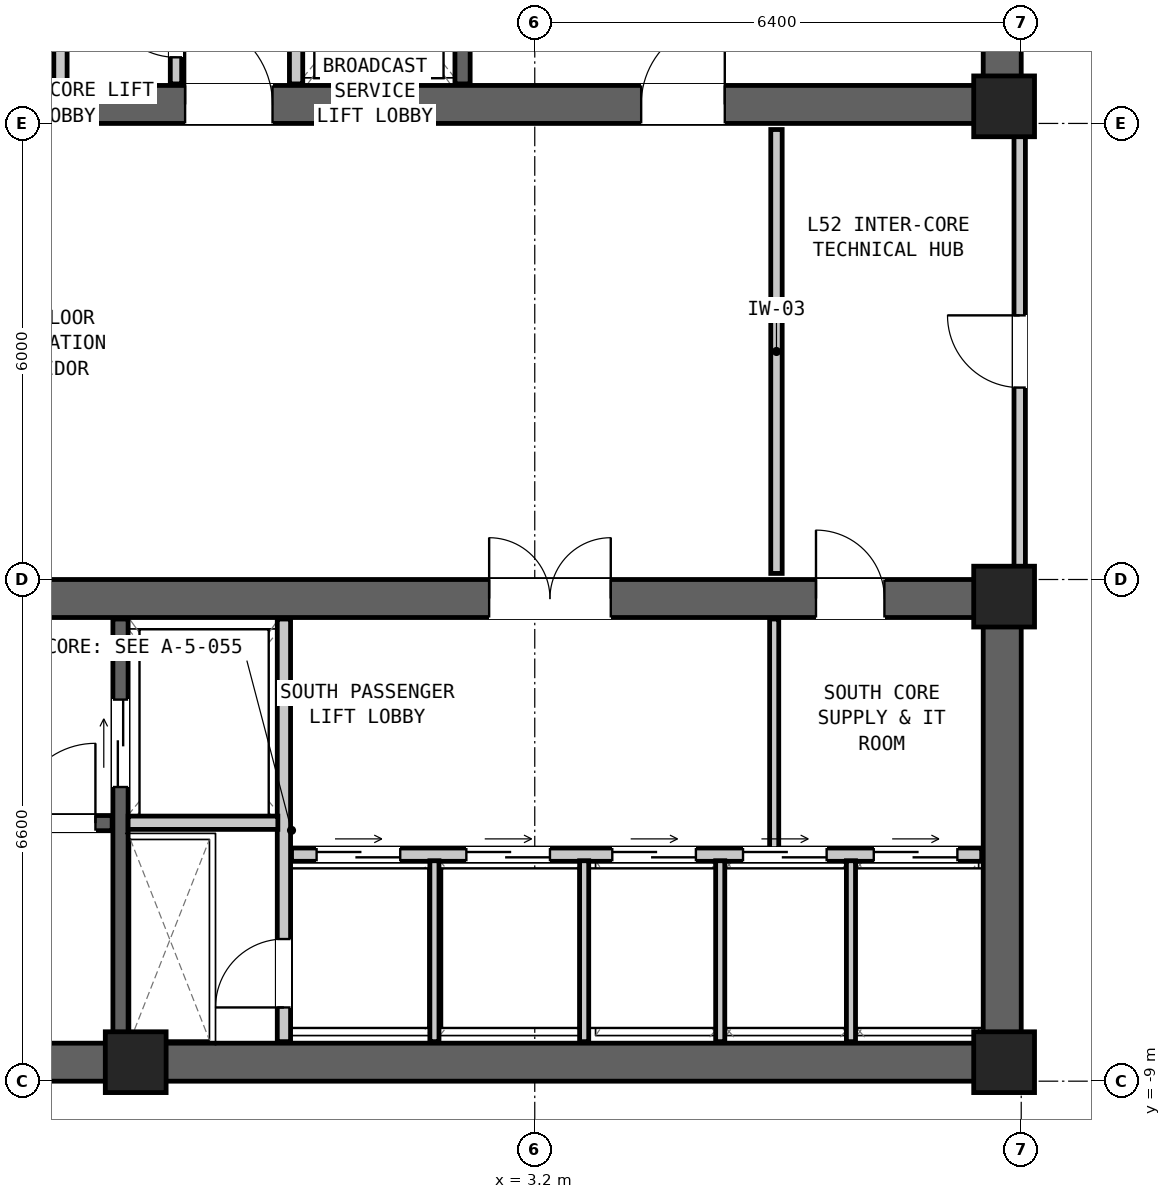
"""IFC4 building model, lengths in metres.
Left out: names, types, materials, properties, quantities, classifications, styles, units other than length and angle.
Written with IfcOpenShell. Run it as: python <this file> out.ifc"""

import sys

from ifc_helpers import new_model, si_unit, direction, frame, frame_2d, origin, origin_2d, place, context, subcontext, project, spatial, rectangle, extrude, element, fill, save


model = new_model("IFC4")
c1 = context("Model", 3, precision=1e-05, world=origin(), true_north=direction((0.0, 1.0)))
c2 = subcontext(c1, "Body", "Model", "MODEL_VIEW")
j1 = project(units=[si_unit("LENGTHUNIT", "METRE"), si_unit("PLANEANGLEUNIT", "RADIAN")], contexts=[c1])
p1 = place(None, origin())
s1 = spatial("IfcSite", under=j1, at=p1, CompositionType="ELEMENT")
p2 = place(p1, origin())
s2 = spatial("IfcBuilding", under=s1, at=p2, CompositionType="ELEMENT")
p3 = place(p2, frame((0.0, 0.0, 177.5)))
s3 = spatial("IfcBuildingStorey", under=s2, at=p3, CompositionType="ELEMENT", Elevation=177.5)
p4 = place(p3, frame((-9.6, 3.85, 0.0), z_axis=(0.0, 0.0, 1.0), x_axis=(1.0, 0.0, 0.0)))
e1 = element("IfcWall", 1, at=p4, inside=s3, PredefinedType="SHEAR", context=c2, shape_type="SweptSolid", body=[
    extrude(rectangle(XDim=19.2, YDim=0.5, at=frame_2d((9.6, 0.0))), origin(), (0.0, 0.0, 1.0), 3.05),
])
p5 = place(p4, frame((14.2, 0.0, 0.0)))
e2 = element("IfcOpeningElement", 2, at=p5, cuts=e1, PredefinedType="OPENING", context=c2, shape_type="SweptSolid", body=[
    extrude(rectangle(XDim=1.1, YDim=2.08, at=frame_2d((0.55, 1.04))), frame((0.0, 0.262, 0.0), z_axis=(0.0, -1.0, 0.0), x_axis=(1.0, 0.0, 0.0)), (0.0, 0.0, 1.0), 0.524),
])
p6 = place(p4, frame((8.2, 0.0, 0.0)))
e3 = element("IfcOpeningElement", 3, at=p6, cuts=e1, PredefinedType="OPENING", context=c2, shape_type="SweptSolid", body=[
    extrude(rectangle(XDim=1.15, YDim=2.1, at=frame_2d((0.575, 1.05))), frame((0.0, 0.262, 0.0), z_axis=(0.0, -1.0, 0.0), x_axis=(1.0, 0.0, 0.0)), (0.0, 0.0, 1.0), 0.524),
])
p7 = place(p4, frame((2.5, 0.0, 0.0)))
e4 = element("IfcOpeningElement", 4, at=p7, cuts=e1, PredefinedType="OPENING", context=c2, shape_type="SweptSolid", body=[
    extrude(rectangle(XDim=1.6, YDim=2.12, at=frame_2d((0.8, 1.06))), frame((0.0, 0.262, 0.0), z_axis=(0.0, -1.0, 0.0), x_axis=(1.0, 0.0, 0.0)), (0.0, 0.0, 1.0), 0.524),
])
p8 = place(p3, frame((9.35, 3.6, 0.0), z_axis=(0.0, 0.0, 1.0), x_axis=(0.0, 1.0, 0.0)))
e5 = element("IfcWall", 5, at=p8, inside=s3, PredefinedType="SHEAR", context=c2, shape_type="SweptSolid", body=[
    extrude(rectangle(XDim=6.6, YDim=0.5, at=frame_2d((3.3, 0.0))), origin(), (0.0, 0.0, 1.0), 3.05),
])
p9 = place(p3, frame((-9.6, -8.75, 0.0), z_axis=(0.0, 0.0, 1.0), x_axis=(1.0, 0.0, 0.0)))
e6 = element("IfcWall", 6, at=p9, inside=s3, PredefinedType="SHEAR", context=c2, shape_type="SweptSolid", body=[
    extrude(rectangle(XDim=19.2, YDim=0.5, at=frame_2d((9.6, 0.0))), origin(), (0.0, 0.0, 1.0), 3.05),
])
p10 = place(p3, frame((-9.6, -2.65, 0.0), z_axis=(0.0, 0.0, 1.0), x_axis=(1.0, 0.0, 0.0)))
e7 = element("IfcWall", 7, at=p10, inside=s3, PredefinedType="SHEAR", context=c2, shape_type="SweptSolid", body=[
    extrude(rectangle(XDim=19.2, YDim=0.5, at=frame_2d((9.6, 0.0))), origin(), (0.0, 0.0, 1.0), 3.05),
])
p11 = place(p10, frame((3.8, 0.0, 0.0)))
e8 = element("IfcOpeningElement", 8, at=p11, cuts=e7, PredefinedType="OPENING", context=c2, shape_type="SweptSolid", body=[
    extrude(rectangle(XDim=1.1, YDim=2.08, at=frame_2d((0.55, 1.04))), frame((0.0, 0.262, 0.0), z_axis=(0.0, -1.0, 0.0), x_axis=(1.0, 0.0, 0.0)), (0.0, 0.0, 1.0), 0.524),
])
p12 = place(p10, frame((12.2, 0.0, 0.0)))
e9 = element("IfcOpeningElement", 9, at=p12, cuts=e7, PredefinedType="OPENING", context=c2, shape_type="SweptSolid", body=[
    extrude(rectangle(XDim=1.6, YDim=2.12, at=frame_2d((0.8, 1.06))), frame((0.0, 0.262, 0.0), z_axis=(0.0, -1.0, 0.0), x_axis=(1.0, 0.0, 0.0)), (0.0, 0.0, 1.0), 0.524),
])
p13 = place(p10, frame((16.5, 0.0, 0.0)))
e10 = element("IfcOpeningElement", 10, at=p13, cuts=e7, PredefinedType="OPENING", context=c2, shape_type="SweptSolid", body=[
    extrude(rectangle(XDim=0.9, YDim=2.05, at=frame_2d((0.45, 1.025))), frame((0.0, 0.262, 0.0), z_axis=(0.0, -1.0, 0.0), x_axis=(1.0, 0.0, 0.0)), (0.0, 0.0, 1.0), 0.524),
])
p14 = place(p3, frame((9.35, -9.0, 0.0), z_axis=(0.0, 0.0, 1.0), x_axis=(0.0, 1.0, 0.0)))
e11 = element("IfcWall", 11, at=p14, inside=s3, PredefinedType="SHEAR", context=c2, shape_type="SweptSolid", body=[
    extrude(rectangle(XDim=6.6, YDim=0.5, at=frame_2d((3.3, 0.0))), origin(), (0.0, 0.0, 1.0), 3.05),
])
for number, where, z_axis, x_axis in (
    (12, (9.375, 3.825, 0.0), (0.0, 0.0, 1.0), (1.0, 0.0, 0.0)),
    (13, (9.375, -2.625, 0.0), (0.0, 0.0, 1.0), (1.0, 0.0, 0.0)),
    (14, (-2.05, -8.75, 0.0), (0.0, 0.0, 1.0), (1.0, 0.0, 0.0)),
    (15, (9.375, -8.75, 0.0), (0.0, 0.0, 1.0), (1.0, 0.0, 0.0)),
):
    element("IfcColumn", number, at=place(p3, frame(where, z_axis=z_axis, x_axis=x_axis)), inside=s3, PredefinedType="COLUMN", context=c2, shape_type="SweptSolid", body=[
        extrude(rectangle(XDim=0.8, YDim=0.8, at=origin_2d()), origin(), (0.0, 0.0, 1.0), 3.05),
    ])
p15 = place(p3, frame((2.25, 4.12, 0.0), z_axis=(0.0, 0.0, 1.0), x_axis=(0.0, 1.0, 0.0)))
e16 = element("IfcWall", 16, at=p15, inside=s3, PredefinedType="SHEAR", context=c2, shape_type="SweptSolid", body=[
    extrude(rectangle(XDim=5.56, YDim=0.2, at=frame_2d((2.78, 0.0))), origin(), (0.0, 0.0, 1.0), 2.83),
])
p16 = place(p15, frame((0.65, 0.0, 0.0)))
e17 = element("IfcOpeningElement", 17, at=p16, cuts=e16, PredefinedType="OPENING", context=c2, shape_type="SweptSolid", body=[
    extrude(rectangle(XDim=1.15, YDim=2.08, at=frame_2d((0.575, 1.04))), frame((0.0, 0.112, 0.0), z_axis=(0.0, -1.0, 0.0), x_axis=(1.0, 0.0, 0.0)), (0.0, 0.0, 1.0), 0.224),
])
p17 = place(p3, frame((0.06, 4.12, 0.0), z_axis=(0.0, 0.0, 1.0), x_axis=(0.0, 1.0, 0.0)))
e18 = element("IfcWall", 18, at=p17, inside=s3, PredefinedType="PARTITIONING", context=c2, shape_type="SweptSolid", body=[
    extrude(rectangle(XDim=5.56, YDim=0.175, at=frame_2d((2.78, 0.0))), origin(), (0.0, 0.0, 1.0), 2.83),
])
p18 = place(p17, frame((3.1, 0.0, 0.0)))
e19 = element("IfcOpeningElement", 19, at=p18, cuts=e18, PredefinedType="OPENING", context=c2, shape_type="SweptSolid", body=[
    extrude(rectangle(XDim=1.4, YDim=2.12, at=frame_2d((0.7, 1.06))), frame((0.0, 0.1, 0.0), z_axis=(0.0, -1.0, 0.0), x_axis=(1.0, 0.0, 0.0)), (0.0, 0.0, 1.0), 0.199),
])
p19 = place(p3, frame((-3.04, 4.12, 0.0), z_axis=(0.0, 0.0, 1.0), x_axis=(0.0, 1.0, 0.0)))
e20 = element("IfcWall", 20, at=p19, inside=s3, PredefinedType="PARTITIONING", context=c2, shape_type="SweptSolid", body=[
    extrude(rectangle(XDim=5.56, YDim=0.175, at=frame_2d((2.78, 0.0))), origin(), (0.0, 0.0, 1.0), 2.83),
])
p20 = place(p3, frame((-1.52, 4.12, 0.0), z_axis=(0.0, 0.0, 1.0), x_axis=(0.0, 1.0, 0.0)))
e21 = element("IfcWall", 21, at=p20, inside=s3, PredefinedType="PARTITIONING", context=c2, shape_type="SweptSolid", body=[
    extrude(rectangle(XDim=5.56, YDim=0.15, at=frame_2d((2.78, 0.0))), origin(), (0.0, 0.0, 1.0), 2.83),
])
p21 = place(p20, frame((3.95, 0.0, 0.0)))
e22 = element("IfcOpeningElement", 22, at=p21, cuts=e21, PredefinedType="OPENING", context=c2, shape_type="SweptSolid", body=[
    extrude(rectangle(XDim=0.9, YDim=2.05, at=frame_2d((0.45, 1.025))), frame((0.0, 0.087, 0.0), z_axis=(0.0, -1.0, 0.0), x_axis=(1.0, 0.0, 0.0)), (0.0, 0.0, 1.0), 0.174),
])
p22 = place(p20, frame((2.2, 0.0, 0.0)))
e23 = element("IfcOpeningElement", 23, at=p22, cuts=e21, PredefinedType="OPENING", context=c2, shape_type="SweptSolid", body=[
    extrude(rectangle(XDim=0.9, YDim=2.05, at=frame_2d((0.45, 1.025))), frame((0.0, 0.087, 0.0), z_axis=(0.0, -1.0, 0.0), x_axis=(1.0, 0.0, 0.0)), (0.0, 0.0, 1.0), 0.174),
])
p23 = place(p20, frame((0.35, 0.0, 0.0)))
e24 = element("IfcOpeningElement", 24, at=p23, cuts=e21, PredefinedType="OPENING", context=c2, shape_type="SweptSolid", body=[
    extrude(rectangle(XDim=0.92, YDim=2.1, at=frame_2d((0.46, 1.05))), frame((0.0, 0.087, 0.0), z_axis=(0.0, -1.0, 0.0), x_axis=(1.0, 0.0, 0.0)), (0.0, 0.0, 1.0), 0.174),
])
p24 = place(p3, frame((-9.08, -5.605, 0.0), z_axis=(0.0, 0.0, 1.0), x_axis=(1.0, 0.0, 0.0)))
e25 = element("IfcWall", 25, at=p24, inside=s3, PredefinedType="SHEAR", context=c2, shape_type="SweptSolid", body=[
    extrude(rectangle(XDim=6.72, YDim=0.2, at=frame_2d((3.36, 0.0))), origin(), (0.0, 0.0, 1.0), 2.83),
])
p25 = place(p24, frame((5.45, 0.0, 0.0)))
e26 = element("IfcOpeningElement", 26, at=p25, cuts=e25, PredefinedType="OPENING", context=c2, shape_type="SweptSolid", body=[
    extrude(rectangle(XDim=1.05, YDim=2.08, at=frame_2d((0.525, 1.04))), frame((0.0, 0.112, 0.0), z_axis=(0.0, -1.0, 0.0), x_axis=(1.0, 0.0, 0.0)), (0.0, 0.0, 1.0), 0.224),
])
p26 = place(p3, frame((-2.25, -8.48, 0.0), z_axis=(0.0, 0.0, 1.0), x_axis=(0.0, 1.0, 0.0)))
e27 = element("IfcWall", 27, at=p26, inside=s3, PredefinedType="SHEAR", context=c2, shape_type="SweptSolid", body=[
    extrude(rectangle(XDim=5.56, YDim=0.2, at=frame_2d((2.78, 0.0))), origin(), (0.0, 0.0, 1.0), 2.83),
])
p27 = place(p26, frame((3.35, 0.0, 0.0)))
e28 = element("IfcOpeningElement", 28, at=p27, cuts=e27, PredefinedType="OPENING", context=c2, shape_type="SweptSolid", body=[
    extrude(rectangle(XDim=1.15, YDim=2.08, at=frame_2d((0.575, 1.04))), frame((0.0, 0.112, 0.0), z_axis=(0.0, -1.0, 0.0), x_axis=(1.0, 0.0, 0.0)), (0.0, 0.0, 1.0), 0.224),
])
p28 = place(p3, frame((-0.1, -8.48, 0.0), z_axis=(0.0, 0.0, 1.0), x_axis=(0.0, 1.0, 0.0)))
e29 = element("IfcWall", 29, at=p28, inside=s3, PredefinedType="PARTITIONING", context=c2, shape_type="SweptSolid", body=[
    extrude(rectangle(XDim=5.56, YDim=0.175, at=frame_2d((2.78, 0.0))), origin(), (0.0, 0.0, 1.0), 2.83),
])
p29 = place(p28, frame((0.45, 0.0, 0.0)))
e30 = element("IfcOpeningElement", 30, at=p29, cuts=e29, PredefinedType="OPENING", context=c2, shape_type="SweptSolid", body=[
    extrude(rectangle(XDim=0.9, YDim=2.05, at=frame_2d((0.45, 1.025))), frame((0.0, 0.1, 0.0), z_axis=(0.0, -1.0, 0.0), x_axis=(1.0, 0.0, 0.0)), (0.0, 0.0, 1.0), 0.199),
])
p30 = place(p3, frame((-2.15, -5.6, 0.0), z_axis=(0.0, 0.0, 1.0), x_axis=(1.0, 0.0, 0.0)))
e31 = element("IfcWall", 31, at=p30, inside=s3, PredefinedType="PARTITIONING", context=c2, shape_type="SweptSolid", body=[
    extrude(rectangle(XDim=1.97, YDim=0.175, at=frame_2d((0.985, 0.0))), origin(), (0.0, 0.0, 1.0), 2.83),
])
p31 = place(p3, frame((0.0, -6.02, 0.0), z_axis=(0.0, 0.0, 1.0), x_axis=(1.0, 0.0, 0.0)))
e32 = element("IfcWall", 32, at=p31, inside=s3, PredefinedType="PARTITIONING", context=c2, shape_type="SweptSolid", body=[
    extrude(rectangle(XDim=9.08, YDim=0.175, at=frame_2d((4.54, 0.0))), origin(), (0.0, 0.0, 1.0), 2.83),
])
p32 = place(p31, frame((0.33, 0.0, 0.0)))
e33 = element("IfcOpeningElement", 33, at=p32, cuts=e32, PredefinedType="OPENING", context=c2, shape_type="SweptSolid", body=[
    extrude(rectangle(XDim=1.1, YDim=2.06, at=frame_2d((0.55, 1.03))), frame((0.0, 0.1, 0.0), z_axis=(0.0, -1.0, 0.0), x_axis=(1.0, 0.0, 0.0)), (0.0, 0.0, 1.0), 0.199),
])
p33 = place(p31, frame((2.3, 0.0, 0.0)))
e34 = element("IfcOpeningElement", 34, at=p33, cuts=e32, PredefinedType="OPENING", context=c2, shape_type="SweptSolid", body=[
    extrude(rectangle(XDim=1.1, YDim=2.06, at=frame_2d((0.55, 1.03))), frame((0.0, 0.1, 0.0), z_axis=(0.0, -1.0, 0.0), x_axis=(1.0, 0.0, 0.0)), (0.0, 0.0, 1.0), 0.199),
])
p34 = place(p31, frame((4.22, 0.0, 0.0)))
e35 = element("IfcOpeningElement", 35, at=p34, cuts=e32, PredefinedType="OPENING", context=c2, shape_type="SweptSolid", body=[
    extrude(rectangle(XDim=1.1, YDim=2.06, at=frame_2d((0.55, 1.03))), frame((0.0, 0.1, 0.0), z_axis=(0.0, -1.0, 0.0), x_axis=(1.0, 0.0, 0.0)), (0.0, 0.0, 1.0), 0.199),
])
p35 = place(p31, frame((5.94, 0.0, 0.0)))
e36 = element("IfcOpeningElement", 36, at=p35, cuts=e32, PredefinedType="OPENING", context=c2, shape_type="SweptSolid", body=[
    extrude(rectangle(XDim=1.1, YDim=2.06, at=frame_2d((0.55, 1.03))), frame((0.0, 0.1, 0.0), z_axis=(0.0, -1.0, 0.0), x_axis=(1.0, 0.0, 0.0)), (0.0, 0.0, 1.0), 0.199),
])
p36 = place(p31, frame((7.66, 0.0, 0.0)))
e37 = element("IfcOpeningElement", 37, at=p36, cuts=e32, PredefinedType="OPENING", context=c2, shape_type="SweptSolid", body=[
    extrude(rectangle(XDim=1.1, YDim=2.06, at=frame_2d((0.55, 1.03))), frame((0.0, 0.1, 0.0), z_axis=(0.0, -1.0, 0.0), x_axis=(1.0, 0.0, 0.0)), (0.0, 0.0, 1.0), 0.199),
])
for number, where, z_axis, x_axis in (
    (38, (1.88, -8.48, 0.0), (0.0, 0.0, 1.0), (0.0, 1.0, 0.0)),
    (39, (3.85, -8.48, 0.0), (0.0, 0.0, 1.0), (0.0, 1.0, 0.0)),
    (40, (5.64, -8.48, 0.0), (0.0, 0.0, 1.0), (0.0, 1.0, 0.0)),
    (41, (7.36, -8.48, 0.0), (0.0, 0.0, 1.0), (0.0, 1.0, 0.0)),
):
    element("IfcWall", number, at=place(p3, frame(where, z_axis=z_axis, x_axis=x_axis)), inside=s3, PredefinedType="PARTITIONING", context=c2, shape_type="SweptSolid", body=[
        extrude(rectangle(XDim=2.38, YDim=0.12, at=frame_2d((1.19, 0.0))), origin(), (0.0, 0.0, 1.0), 2.83),
    ])
p37 = place(p3, frame((6.35, -5.94, 0.0), z_axis=(0.0, 0.0, 1.0), x_axis=(0.0, 1.0, 0.0)))
e42 = element("IfcWall", 42, at=p37, inside=s3, PredefinedType="PARTITIONING", context=c2, shape_type="SweptSolid", body=[
    extrude(rectangle(XDim=3.02, YDim=0.12, at=frame_2d((1.51, 0.0))), origin(), (0.0, 0.0, 1.0), 2.83),
])
p38 = place(p3, frame((6.38, -2.32, 0.0), z_axis=(0.0, 0.0, 1.0), x_axis=(0.0, 1.0, 0.0)))
e43 = element("IfcWall", 43, at=p38, inside=s3, PredefinedType="PARTITIONING", context=c2, shape_type="SweptSolid", body=[
    extrude(rectangle(XDim=5.84, YDim=0.15, at=frame_2d((2.92, 0.0))), origin(), (0.0, 0.0, 1.0), 2.198),
])
p39 = place(p3, frame((9.58, -2.32, 0.0), z_axis=(0.0, 0.0, 1.0), x_axis=(0.0, 1.0, 0.0)))
e44 = element("IfcWall", 44, at=p39, inside=s3, PredefinedType="PARTITIONING", context=c2, shape_type="SweptSolid", body=[
    extrude(rectangle(XDim=5.84, YDim=0.15, at=frame_2d((2.92, 0.0))), origin(), (0.0, 0.0, 1.0), 2.198),
])
p40 = place(p39, frame((2.445, 0.0, 0.0)))
e45 = element("IfcOpeningElement", 45, at=p40, cuts=e44, PredefinedType="OPENING", context=c2, shape_type="SweptSolid", body=[
    extrude(rectangle(XDim=0.95, YDim=2.1, at=frame_2d((0.475, 1.05))), frame((0.0, 0.087, 0.0), z_axis=(0.0, -1.0, 0.0), x_axis=(1.0, 0.0, 0.0)), (0.0, 0.0, 1.0), 0.174),
])
p41 = place(p5, origin())
e46 = element("IfcDoor", 46, at=p41, inside=s3, OperationType="SINGLE_SWING_RIGHT", PredefinedType="DOOR", context=c2, shape_type="SweptSolid", body=[
    extrude(rectangle(XDim=1.1, YDim=2.08, at=frame_2d((0.55, 1.04))), frame((0.0, 0.025, 0.0), z_axis=(0.0, -1.0, 0.0), x_axis=(1.0, 0.0, 0.0)), (0.0, 0.0, 1.0), 0.05),
])
fill(e2, e46)
p42 = place(p6, origin())
e47 = element("IfcDoor", 47, at=p42, inside=s3, OperationType="SINGLE_SWING_LEFT", PredefinedType="DOOR", context=c2, shape_type="SweptSolid", body=[
    extrude(rectangle(XDim=1.15, YDim=2.1, at=frame_2d((0.575, 1.05))), frame((0.0, 0.025, 0.0), z_axis=(0.0, -1.0, 0.0), x_axis=(1.0, 0.0, 0.0)), (0.0, 0.0, 1.0), 0.05),
])
fill(e3, e47)
p43 = place(p23, origin())
e48 = element("IfcDoor", 48, at=p43, inside=s3, OperationType="SINGLE_SWING_RIGHT", PredefinedType="DOOR", context=c2, shape_type="SweptSolid", body=[
    extrude(rectangle(XDim=0.92, YDim=2.1, at=frame_2d((0.46, 1.05))), frame((0.0, 0.025, 0.0), z_axis=(0.0, -1.0, 0.0), x_axis=(1.0, 0.0, 0.0)), (0.0, 0.0, 1.0), 0.05),
])
fill(e24, e48)
p44 = place(p25, origin())
e49 = element("IfcDoor", 49, at=p44, inside=s3, OperationType="SINGLE_SWING_RIGHT", PredefinedType="DOOR", context=c2, shape_type="SweptSolid", body=[
    extrude(rectangle(XDim=1.05, YDim=2.08, at=frame_2d((0.525, 1.04))), frame((0.0, 0.025, 0.0), z_axis=(0.0, -1.0, 0.0), x_axis=(1.0, 0.0, 0.0)), (0.0, 0.0, 1.0), 0.05),
])
fill(e26, e49)
p45 = place(p27, origin())
e50 = element("IfcDoor", 50, at=p45, inside=s3, OperationType="DOUBLE_DOOR_SLIDING", PredefinedType="DOOR", context=c2, shape_type="SweptSolid", body=[
    extrude(rectangle(XDim=1.15, YDim=2.08, at=frame_2d((0.575, 1.04))), frame((0.0, 0.025, 0.0), z_axis=(0.0, -1.0, 0.0), x_axis=(1.0, 0.0, 0.0)), (0.0, 0.0, 1.0), 0.05),
])
fill(e28, e50)
p46 = place(p29, origin())
e51 = element("IfcDoor", 51, at=p46, inside=s3, OperationType="SINGLE_SWING_LEFT", PredefinedType="DOOR", context=c2, shape_type="SweptSolid", body=[
    extrude(rectangle(XDim=0.9, YDim=2.05, at=frame_2d((0.45, 1.025))), frame((0.0, 0.025, 0.0), z_axis=(0.0, -1.0, 0.0), x_axis=(1.0, 0.0, 0.0)), (0.0, 0.0, 1.0), 0.05),
])
fill(e30, e51)
p47 = place(p32, origin())
e52 = element("IfcDoor", 52, at=p47, inside=s3, OperationType="DOUBLE_DOOR_SLIDING", PredefinedType="DOOR", context=c2, shape_type="SweptSolid", body=[
    extrude(rectangle(XDim=1.1, YDim=2.06, at=frame_2d((0.55, 1.03))), frame((0.0, 0.025, 0.0), z_axis=(0.0, -1.0, 0.0), x_axis=(1.0, 0.0, 0.0)), (0.0, 0.0, 1.0), 0.05),
])
fill(e33, e52)
p48 = place(p33, origin())
e53 = element("IfcDoor", 53, at=p48, inside=s3, OperationType="DOUBLE_DOOR_SLIDING", PredefinedType="DOOR", context=c2, shape_type="SweptSolid", body=[
    extrude(rectangle(XDim=1.1, YDim=2.06, at=frame_2d((0.55, 1.03))), frame((0.0, 0.025, 0.0), z_axis=(0.0, -1.0, 0.0), x_axis=(1.0, 0.0, 0.0)), (0.0, 0.0, 1.0), 0.05),
])
fill(e34, e53)
p49 = place(p12, origin())
e54 = element("IfcDoor", 54, at=p49, inside=s3, OperationType="DOUBLE_DOOR_SINGLE_SWING", PredefinedType="DOOR", context=c2, shape_type="SweptSolid", body=[
    extrude(rectangle(XDim=1.6, YDim=2.12, at=frame_2d((0.8, 1.06))), frame((0.0, 0.025, 0.0), z_axis=(0.0, -1.0, 0.0), x_axis=(1.0, 0.0, 0.0)), (0.0, 0.0, 1.0), 0.05),
])
fill(e9, e54)
p50 = place(p13, origin())
e55 = element("IfcDoor", 55, at=p50, inside=s3, OperationType="SINGLE_SWING_LEFT", PredefinedType="DOOR", context=c2, shape_type="SweptSolid", body=[
    extrude(rectangle(XDim=0.9, YDim=2.05, at=frame_2d((0.45, 1.025))), frame((0.0, 0.025, 0.0), z_axis=(0.0, -1.0, 0.0), x_axis=(1.0, 0.0, 0.0)), (0.0, 0.0, 1.0), 0.05),
])
fill(e10, e55)
p51 = place(p40, origin())
e56 = element("IfcDoor", 56, at=p51, inside=s3, OperationType="SINGLE_SWING_RIGHT", PredefinedType="DOOR", context=c2, shape_type="SweptSolid", body=[
    extrude(rectangle(XDim=0.95, YDim=2.1, at=frame_2d((0.475, 1.05))), frame((0.0, 0.025, 0.0), z_axis=(0.0, -1.0, 0.0), x_axis=(1.0, 0.0, 0.0)), (0.0, 0.0, 1.0), 0.05),
])
fill(e45, e56)
p52 = place(p34, origin())
e57 = element("IfcDoor", 57, at=p52, inside=s3, OperationType="DOUBLE_DOOR_SLIDING", PredefinedType="DOOR", context=c2, shape_type="SweptSolid", body=[
    extrude(rectangle(XDim=1.1, YDim=2.06, at=frame_2d((0.55, 1.03))), frame((0.0, 0.025, 0.0), z_axis=(0.0, -1.0, 0.0), x_axis=(1.0, 0.0, 0.0)), (0.0, 0.0, 1.0), 0.05),
])
fill(e35, e57)
p53 = place(p35, origin())
e58 = element("IfcDoor", 58, at=p53, inside=s3, OperationType="DOUBLE_DOOR_SLIDING", PredefinedType="DOOR", context=c2, shape_type="SweptSolid", body=[
    extrude(rectangle(XDim=1.1, YDim=2.06, at=frame_2d((0.55, 1.03))), frame((0.0, 0.025, 0.0), z_axis=(0.0, -1.0, 0.0), x_axis=(1.0, 0.0, 0.0)), (0.0, 0.0, 1.0), 0.05),
])
fill(e36, e58)
p54 = place(p36, origin())
e59 = element("IfcDoor", 59, at=p54, inside=s3, OperationType="DOUBLE_DOOR_SLIDING", PredefinedType="DOOR", context=c2, shape_type="SweptSolid", body=[
    extrude(rectangle(XDim=1.1, YDim=2.06, at=frame_2d((0.55, 1.03))), frame((0.0, 0.025, 0.0), z_axis=(0.0, -1.0, 0.0), x_axis=(1.0, 0.0, 0.0)), (0.0, 0.0, 1.0), 0.05),
])
fill(e37, e59)
save(model, sys.argv[1])
